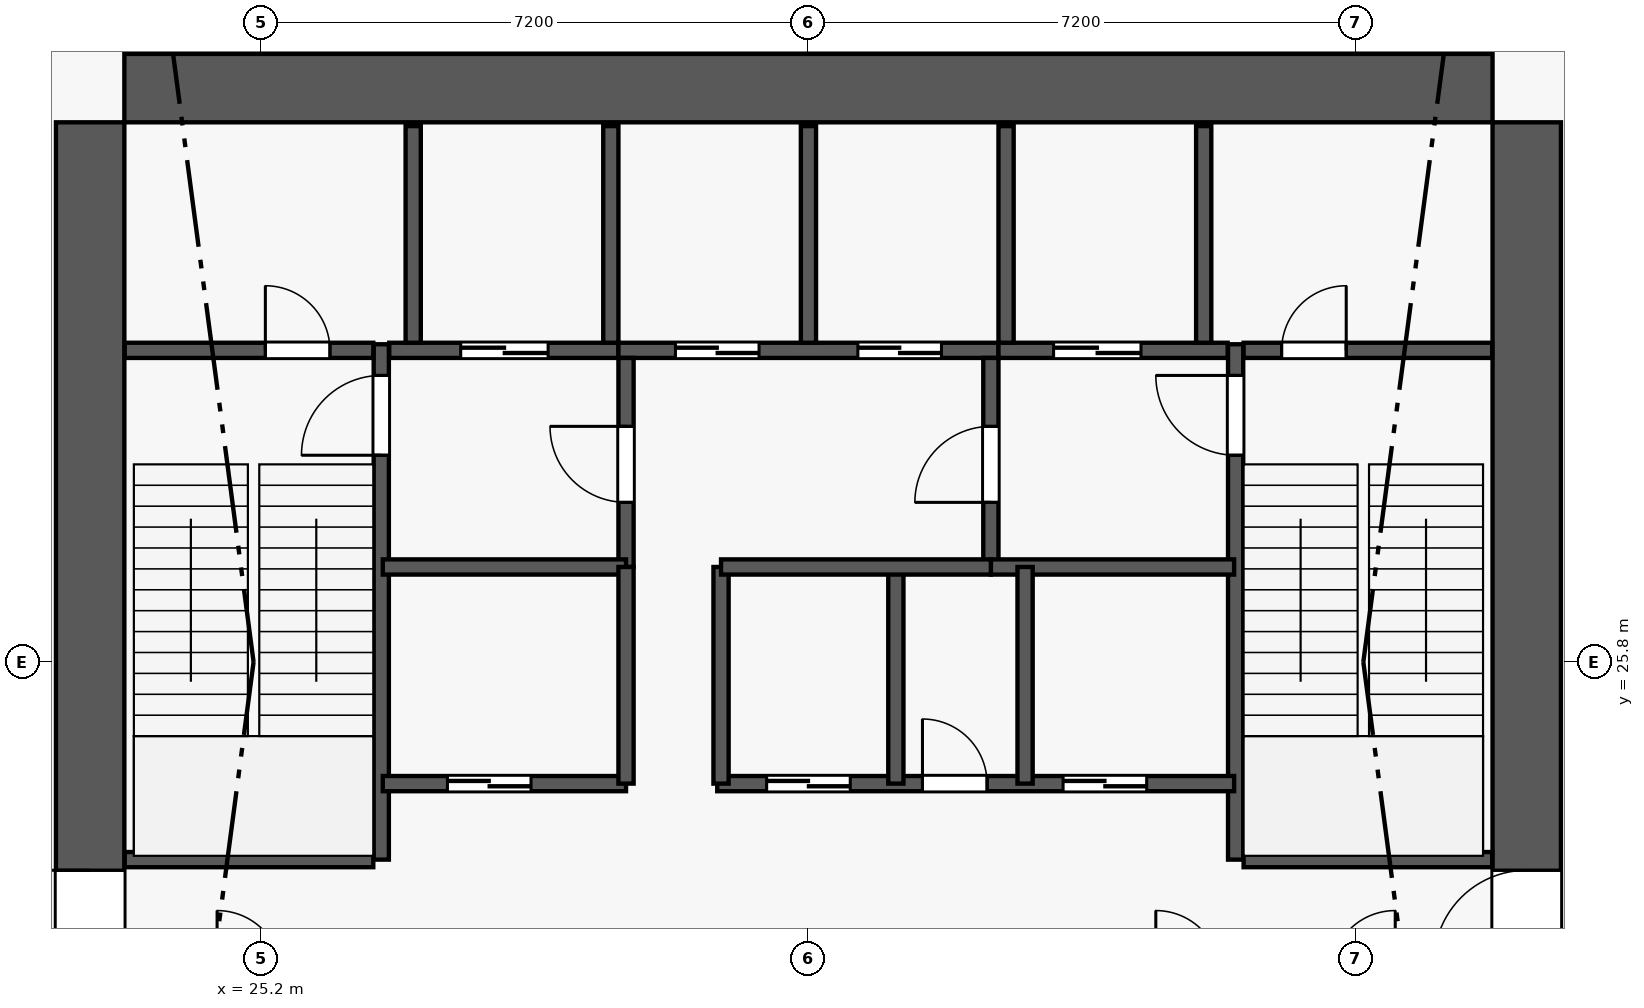
"""IFC4 building model, lengths in metres.
Left out: names, types, materials, properties, quantities, classifications, styles, units other than length and angle.
Written with IfcOpenShell. Run it as: python <this file> out.ifc"""

import sys

from ifc_helpers import new_model, si_unit, direction, frame, frame_2d, origin, origin_2d, place, context, subcontext, project, spatial, rectangle, extrude, element, fill, save


model = new_model("IFC4")
c1 = context("Model", 3, precision=1e-05, world=origin(), true_north=direction((0.0, 1.0)))
c2 = subcontext(c1, "Body", "Model", "MODEL_VIEW")
j1 = project(units=[si_unit("LENGTHUNIT", "METRE"), si_unit("PLANEANGLEUNIT", "RADIAN")], contexts=[c1])
p1 = place(None, origin())
s1 = spatial("IfcSite", under=j1, at=p1, CompositionType="ELEMENT")
p2 = place(p1, origin())
s2 = spatial("IfcBuilding", under=s1, at=p2, CompositionType="ELEMENT")
p3 = place(p2, frame((0.0, 0.0, -4.8)))
s3 = spatial("IfcBuildingStorey", under=s2, at=p3, CompositionType="ELEMENT", Elevation=-4.8)
for number, where, z_axis, x_axis in (
    (1, (41.85, 33.35, 0.0), (0.0, 0.0, 1.0), (1.0, 0.0, 0.0)),
    (2, (22.95, 33.35, 0.0), (0.0, 0.0, 1.0), (1.0, 0.0, 0.0)),
):
    element("IfcColumn", number, at=place(p3, frame(where, z_axis=z_axis, x_axis=x_axis)), inside=s3, PredefinedType="COLUMN", context=c2, shape_type="SweptSolid", body=[
        extrude(rectangle(XDim=0.9, YDim=0.9, at=origin_2d()), origin(), (0.0, 0.0, 1.0), 4.8),
    ])
p4 = place(p3, frame((23.4, 33.35, 0.0), z_axis=(0.0, 0.0, 1.0), x_axis=(1.0, 0.0, 0.0)))
e3 = element("IfcWall", 3, at=p4, inside=s3, PredefinedType="SHEAR", context=c2, shape_type="SweptSolid", body=[
    extrude(rectangle(XDim=18.0, YDim=0.9, at=frame_2d((9.0, 0.0))), origin(), (0.0, 0.0, 1.0), 4.55),
])
p5 = place(p3, frame((22.95, 18.9, 0.0), z_axis=(0.0, 0.0, 1.0), x_axis=(0.0, 1.0, 0.0)))
e4 = element("IfcWall", 4, at=p5, inside=s3, PredefinedType="SHEAR", context=c2, shape_type="SweptSolid", body=[
    extrude(rectangle(XDim=14.0, YDim=0.9, at=frame_2d((7.0, 0.0))), origin(), (0.0, 0.0, 1.0), 4.55),
])
p6 = place(p5, frame((2.94, 0.0, 0.0)))
e5 = element("IfcOpeningElement", 5, at=p6, cuts=e4, PredefinedType="OPENING", context=c2, shape_type="SweptSolid", body=[
    extrude(rectangle(XDim=1.22, YDim=2.25, at=frame_2d((0.61, 1.125))), frame((0.0, 0.46, 0.0), z_axis=(0.0, -1.0, 0.0), x_axis=(1.0, 0.0, 0.0)), (0.0, 0.0, 1.0), 0.92),
])
p7 = place(p3, frame((41.85, 18.9, 0.0), z_axis=(0.0, 0.0, 1.0), x_axis=(0.0, 1.0, 0.0)))
e6 = element("IfcWall", 6, at=p7, inside=s3, PredefinedType="SHEAR", context=c2, shape_type="SweptSolid", body=[
    extrude(rectangle(XDim=14.0, YDim=0.9, at=frame_2d((7.0, 0.0))), origin(), (0.0, 0.0, 1.0), 4.55),
])
p8 = place(p7, frame((2.94, 0.0, 0.0)))
e7 = element("IfcOpeningElement", 7, at=p8, cuts=e6, PredefinedType="OPENING", context=c2, shape_type="SweptSolid", body=[
    extrude(rectangle(XDim=1.22, YDim=2.25, at=frame_2d((0.61, 1.125))), frame((0.0, 0.46, 0.0), z_axis=(0.0, -1.0, 0.0), x_axis=(1.0, 0.0, 0.0)), (0.0, 0.0, 1.0), 0.92),
])
p9 = place(p3, frame((26.78, 23.2, 0.0), z_axis=(0.0, 0.0, 1.0), x_axis=(0.0, 1.0, 0.0)))
e8 = element("IfcWall", 8, at=p9, inside=s3, PredefinedType="SHEAR", context=c2, shape_type="SweptSolid", body=[
    extrude(rectangle(XDim=6.78, YDim=0.2, at=frame_2d((3.39, 0.0))), origin(), (0.0, 0.0, 1.0), 4.8),
])
p10 = place(p9, frame((5.32, 0.0, 0.0)))
e9 = element("IfcOpeningElement", 9, at=p10, cuts=e8, PredefinedType="OPENING", context=c2, shape_type="SweptSolid", body=[
    extrude(rectangle(XDim=1.05, YDim=2.15, at=frame_2d((0.525, 1.075))), frame((0.0, 0.11, 0.0), z_axis=(0.0, -1.0, 0.0), x_axis=(1.0, 0.0, 0.0)), (0.0, 0.0, 1.0), 0.22),
])
p11 = place(p3, frame((23.405, 23.2, 0.0), z_axis=(0.0, 0.0, 1.0), x_axis=(1.0, 0.0, 0.0)))
e10 = element("IfcWall", 10, at=p11, inside=s3, PredefinedType="PLUMBINGWALL", context=c2, shape_type="SweptSolid", body=[
    extrude(rectangle(XDim=3.27, YDim=0.2, at=frame_2d((1.635, 0.0))), origin(), (0.0, 0.0, 1.0), 4.55),
])
p12 = place(p3, frame((38.02, 23.2, 0.0), z_axis=(0.0, 0.0, 1.0), x_axis=(0.0, 1.0, 0.0)))
e11 = element("IfcWall", 11, at=p12, inside=s3, PredefinedType="SHEAR", context=c2, shape_type="SweptSolid", body=[
    extrude(rectangle(XDim=6.78, YDim=0.2, at=frame_2d((3.39, 0.0))), origin(), (0.0, 0.0, 1.0), 4.8),
])
p13 = place(p12, frame((5.32, 0.0, 0.0)))
e12 = element("IfcOpeningElement", 12, at=p13, cuts=e11, PredefinedType="OPENING", context=c2, shape_type="SweptSolid", body=[
    extrude(rectangle(XDim=1.05, YDim=2.15, at=frame_2d((0.525, 1.075))), frame((0.0, 0.11, 0.0), z_axis=(0.0, -1.0, 0.0), x_axis=(1.0, 0.0, 0.0)), (0.0, 0.0, 1.0), 0.22),
])
p14 = place(p3, frame((38.125, 23.2, 0.0), z_axis=(0.0, 0.0, 1.0), x_axis=(1.0, 0.0, 0.0)))
e13 = element("IfcWall", 13, at=p14, inside=s3, PredefinedType="PLUMBINGWALL", context=c2, shape_type="SweptSolid", body=[
    extrude(rectangle(XDim=3.27, YDim=0.2, at=frame_2d((1.635, 0.0))), origin(), (0.0, 0.0, 1.0), 4.55),
])
p15 = place(p3, frame((23.405, 29.9, 0.0), z_axis=(0.0, 0.0, 1.0), x_axis=(1.0, 0.0, 0.0)))
e14 = element("IfcWall", 14, at=p15, inside=s3, PredefinedType="PLUMBINGWALL", context=c2, shape_type="SweptSolid", body=[
    extrude(rectangle(XDim=3.27, YDim=0.2, at=frame_2d((1.635, 0.0))), origin(), (0.0, 0.0, 1.0), 4.55),
])
p16 = place(p15, frame((1.85, 0.0, 0.0)))
e15 = element("IfcOpeningElement", 15, at=p16, cuts=e14, PredefinedType="OPENING", context=c2, shape_type="SweptSolid", body=[
    extrude(rectangle(XDim=0.85, YDim=2.05, at=frame_2d((0.425, 1.025))), frame((0.0, 0.11, 0.0), z_axis=(0.0, -1.0, 0.0), x_axis=(1.0, 0.0, 0.0)), (0.0, 0.0, 1.0), 0.22),
])
p17 = place(p3, frame((26.885, 29.9, 0.0), z_axis=(0.0, 0.0, 1.0), x_axis=(1.0, 0.0, 0.0)))
e16 = element("IfcWall", 16, at=p17, inside=s3, PredefinedType="PLUMBINGWALL", context=c2, shape_type="SweptSolid", body=[
    extrude(rectangle(XDim=3.015, YDim=0.2, at=frame_2d((1.507, 0.0))), origin(), (0.0, 0.0, 1.0), 4.55),
])
p18 = place(p17, frame((0.94, 0.0, 0.0)))
e17 = element("IfcOpeningElement", 17, at=p18, cuts=e16, PredefinedType="OPENING", context=c2, shape_type="SweptSolid", body=[
    extrude(rectangle(XDim=1.15, YDim=2.2, at=frame_2d((0.575, 1.1))), frame((0.0, 0.11, 0.0), z_axis=(0.0, -1.0, 0.0), x_axis=(1.0, 0.0, 0.0)), (0.0, 0.0, 1.0), 0.22),
])
p19 = place(p3, frame((29.9, 29.9, 0.0), z_axis=(0.0, 0.0, 1.0), x_axis=(1.0, 0.0, 0.0)))
e18 = element("IfcWall", 18, at=p19, inside=s3, PredefinedType="PLUMBINGWALL", context=c2, shape_type="SweptSolid", body=[
    extrude(rectangle(XDim=5.0, YDim=0.2, at=frame_2d((2.5, 0.0))), origin(), (0.0, 0.0, 1.0), 4.55),
])
p20 = place(p19, frame((0.75, 0.0, 0.0)))
e19 = element("IfcOpeningElement", 19, at=p20, cuts=e18, PredefinedType="OPENING", context=c2, shape_type="SweptSolid", body=[
    extrude(rectangle(XDim=1.1, YDim=2.2, at=frame_2d((0.55, 1.1))), frame((0.0, 0.11, 0.0), z_axis=(0.0, -1.0, 0.0), x_axis=(1.0, 0.0, 0.0)), (0.0, 0.0, 1.0), 0.22),
])
p21 = place(p19, frame((3.15, 0.0, 0.0)))
e20 = element("IfcOpeningElement", 20, at=p21, cuts=e18, PredefinedType="OPENING", context=c2, shape_type="SweptSolid", body=[
    extrude(rectangle(XDim=1.1, YDim=2.2, at=frame_2d((0.55, 1.1))), frame((0.0, 0.11, 0.0), z_axis=(0.0, -1.0, 0.0), x_axis=(1.0, 0.0, 0.0)), (0.0, 0.0, 1.0), 0.22),
])
p22 = place(p3, frame((34.9, 29.9, 0.0), z_axis=(0.0, 0.0, 1.0), x_axis=(1.0, 0.0, 0.0)))
e21 = element("IfcWall", 21, at=p22, inside=s3, PredefinedType="PLUMBINGWALL", context=c2, shape_type="SweptSolid", body=[
    extrude(rectangle(XDim=3.015, YDim=0.2, at=frame_2d((1.508, 0.0))), origin(), (0.0, 0.0, 1.0), 4.55),
])
p23 = place(p22, frame((0.725, 0.0, 0.0)))
e22 = element("IfcOpeningElement", 22, at=p23, cuts=e21, PredefinedType="OPENING", context=c2, shape_type="SweptSolid", body=[
    extrude(rectangle(XDim=1.15, YDim=2.2, at=frame_2d((0.575, 1.1))), frame((0.0, 0.11, 0.0), z_axis=(0.0, -1.0, 0.0), x_axis=(1.0, 0.0, 0.0)), (0.0, 0.0, 1.0), 0.22),
])
p24 = place(p3, frame((38.125, 29.9, 0.0), z_axis=(0.0, 0.0, 1.0), x_axis=(1.0, 0.0, 0.0)))
e23 = element("IfcWall", 23, at=p24, inside=s3, PredefinedType="PLUMBINGWALL", context=c2, shape_type="SweptSolid", body=[
    extrude(rectangle(XDim=3.27, YDim=0.2, at=frame_2d((1.635, 0.0))), origin(), (0.0, 0.0, 1.0), 4.55),
])
p25 = place(p24, frame((0.5, 0.0, 0.0)))
e24 = element("IfcOpeningElement", 24, at=p25, cuts=e23, PredefinedType="OPENING", context=c2, shape_type="SweptSolid", body=[
    extrude(rectangle(XDim=0.85, YDim=2.05, at=frame_2d((0.425, 1.025))), frame((0.0, 0.11, 0.0), z_axis=(0.0, -1.0, 0.0), x_axis=(1.0, 0.0, 0.0)), (0.0, 0.0, 1.0), 0.22),
])
for number, where, z_axis, x_axis in (
    (25, (27.2, 30.0, 0.0), (0.0, 0.0, 1.0), (0.0, 1.0, 0.0)),
    (26, (29.8, 30.0, 0.0), (0.0, 0.0, 1.0), (0.0, 1.0, 0.0)),
    (27, (32.4, 30.0, 0.0), (0.0, 0.0, 1.0), (0.0, 1.0, 0.0)),
    (28, (35.0, 30.0, 0.0), (0.0, 0.0, 1.0), (0.0, 1.0, 0.0)),
    (29, (37.6, 30.0, 0.0), (0.0, 0.0, 1.0), (0.0, 1.0, 0.0)),
):
    element("IfcWall", number, at=place(p3, frame(where, z_axis=z_axis, x_axis=x_axis)), inside=s3, PredefinedType="PLUMBINGWALL", context=c2, shape_type="SweptSolid", body=[
        extrude(rectangle(XDim=2.85, YDim=0.2, at=frame_2d((1.425, 0.0))), origin(), (0.0, 0.0, 1.0), 4.55),
    ])
p26 = place(p3, frame((30.0, 27.05, 0.0), z_axis=(0.0, 0.0, 1.0), x_axis=(0.0, 1.0, 0.0)))
e30 = element("IfcWall", 30, at=p26, inside=s3, PredefinedType="PLUMBINGWALL", context=c2, shape_type="SweptSolid", body=[
    extrude(rectangle(XDim=2.75, YDim=0.2, at=frame_2d((1.375, 0.0))), origin(), (0.0, 0.0, 1.0), 4.55),
])
p27 = place(p26, frame((0.85, 0.0, 0.0)))
e31 = element("IfcOpeningElement", 31, at=p27, cuts=e30, PredefinedType="OPENING", context=c2, shape_type="SweptSolid", body=[
    extrude(rectangle(XDim=1.0, YDim=2.15, at=frame_2d((0.5, 1.075))), frame((0.0, 0.11, 0.0), z_axis=(0.0, -1.0, 0.0), x_axis=(1.0, 0.0, 0.0)), (0.0, 0.0, 1.0), 0.22),
])
p28 = place(p3, frame((26.8, 27.05, 0.0), z_axis=(0.0, 0.0, 1.0), x_axis=(1.0, 0.0, 0.0)))
e32 = element("IfcWall", 32, at=p28, inside=s3, PredefinedType="PLUMBINGWALL", context=c2, shape_type="SweptSolid", body=[
    extrude(rectangle(XDim=3.2, YDim=0.2, at=frame_2d((1.6, 0.0))), origin(), (0.0, 0.0, 1.0), 4.55),
])
p29 = place(p3, frame((34.8, 27.05, 0.0), z_axis=(0.0, 0.0, 1.0), x_axis=(0.0, 1.0, 0.0)))
e33 = element("IfcWall", 33, at=p29, inside=s3, PredefinedType="PLUMBINGWALL", context=c2, shape_type="SweptSolid", body=[
    extrude(rectangle(XDim=2.75, YDim=0.2, at=frame_2d((1.375, 0.0))), origin(), (0.0, 0.0, 1.0), 4.55),
])
p30 = place(p29, frame((0.85, 0.0, 0.0)))
e34 = element("IfcOpeningElement", 34, at=p30, cuts=e33, PredefinedType="OPENING", context=c2, shape_type="SweptSolid", body=[
    extrude(rectangle(XDim=1.0, YDim=2.15, at=frame_2d((0.5, 1.075))), frame((0.0, 0.11, 0.0), z_axis=(0.0, -1.0, 0.0), x_axis=(1.0, 0.0, 0.0)), (0.0, 0.0, 1.0), 0.22),
])
p31 = place(p3, frame((34.8, 27.05, 0.0), z_axis=(0.0, 0.0, 1.0), x_axis=(1.0, 0.0, 0.0)))
e35 = element("IfcWall", 35, at=p31, inside=s3, PredefinedType="PLUMBINGWALL", context=c2, shape_type="SweptSolid", body=[
    extrude(rectangle(XDim=3.2, YDim=0.2, at=frame_2d((1.6, 0.0))), origin(), (0.0, 0.0, 1.0), 4.55),
])
p32 = place(p3, frame((26.8, 24.2, 0.0), z_axis=(0.0, 0.0, 1.0), x_axis=(1.0, 0.0, 0.0)))
e36 = element("IfcWall", 36, at=p32, inside=s3, PredefinedType="PLUMBINGWALL", context=c2, shape_type="SweptSolid", body=[
    extrude(rectangle(XDim=3.2, YDim=0.2, at=frame_2d((1.6, 0.0))), origin(), (0.0, 0.0, 1.0), 4.55),
])
p33 = place(p32, frame((0.85, 0.0, 0.0)))
e37 = element("IfcOpeningElement", 37, at=p33, cuts=e36, PredefinedType="OPENING", context=c2, shape_type="SweptSolid", body=[
    extrude(rectangle(XDim=1.1, YDim=2.2, at=frame_2d((0.55, 1.1))), frame((0.0, 0.11, 0.0), z_axis=(0.0, -1.0, 0.0), x_axis=(1.0, 0.0, 0.0)), (0.0, 0.0, 1.0), 0.22),
])
p34 = place(p3, frame((30.0, 24.2, 0.0), z_axis=(0.0, 0.0, 1.0), x_axis=(0.0, 1.0, 0.0)))
e38 = element("IfcWall", 38, at=p34, inside=s3, PredefinedType="PLUMBINGWALL", context=c2, shape_type="SweptSolid", body=[
    extrude(rectangle(XDim=2.85, YDim=0.2, at=frame_2d((1.425, 0.0))), origin(), (0.0, 0.0, 1.0), 4.55),
])
p35 = place(p3, frame((31.2, 24.2, 0.0), z_axis=(0.0, 0.0, 1.0), x_axis=(1.0, 0.0, 0.0)))
e39 = element("IfcWall", 39, at=p35, inside=s3, PredefinedType="PLUMBINGWALL", context=c2, shape_type="SweptSolid", body=[
    extrude(rectangle(XDim=6.8, YDim=0.2, at=frame_2d((3.4, 0.0))), origin(), (0.0, 0.0, 1.0), 4.55),
])
p36 = place(p35, frame((0.65, 0.0, 0.0)))
e40 = element("IfcOpeningElement", 40, at=p36, cuts=e39, PredefinedType="OPENING", context=c2, shape_type="SweptSolid", body=[
    extrude(rectangle(XDim=1.1, YDim=2.2, at=frame_2d((0.55, 1.1))), frame((0.0, 0.11, 0.0), z_axis=(0.0, -1.0, 0.0), x_axis=(1.0, 0.0, 0.0)), (0.0, 0.0, 1.0), 0.22),
])
p37 = place(p35, frame((2.7, 0.0, 0.0)))
e41 = element("IfcOpeningElement", 41, at=p37, cuts=e39, PredefinedType="OPENING", context=c2, shape_type="SweptSolid", body=[
    extrude(rectangle(XDim=0.85, YDim=2.05, at=frame_2d((0.425, 1.025))), frame((0.0, 0.11, 0.0), z_axis=(0.0, -1.0, 0.0), x_axis=(1.0, 0.0, 0.0)), (0.0, 0.0, 1.0), 0.22),
])
p38 = place(p35, frame((4.55, 0.0, 0.0)))
e42 = element("IfcOpeningElement", 42, at=p38, cuts=e39, PredefinedType="OPENING", context=c2, shape_type="SweptSolid", body=[
    extrude(rectangle(XDim=1.1, YDim=2.2, at=frame_2d((0.55, 1.1))), frame((0.0, 0.11, 0.0), z_axis=(0.0, -1.0, 0.0), x_axis=(1.0, 0.0, 0.0)), (0.0, 0.0, 1.0), 0.22),
])
for number, where, z_axis, x_axis in (
    (43, (31.25, 24.2, 0.0), (0.0, 0.0, 1.0), (0.0, 1.0, 0.0)),
    (44, (33.55, 24.2, 0.0), (0.0, 0.0, 1.0), (0.0, 1.0, 0.0)),
    (45, (35.25, 24.2, 0.0), (0.0, 0.0, 1.0), (0.0, 1.0, 0.0)),
):
    element("IfcWall", number, at=place(p3, frame(where, z_axis=z_axis, x_axis=x_axis)), inside=s3, PredefinedType="PLUMBINGWALL", context=c2, shape_type="SweptSolid", body=[
        extrude(rectangle(XDim=2.85, YDim=0.2, at=frame_2d((1.425, 0.0))), origin(), (0.0, 0.0, 1.0), 4.55),
    ])
p39 = place(p3, frame((31.25, 27.05, 0.0), z_axis=(0.0, 0.0, 1.0), x_axis=(1.0, 0.0, 0.0)))
e46 = element("IfcWall", 46, at=p39, inside=s3, PredefinedType="PLUMBINGWALL", context=c2, shape_type="SweptSolid", body=[
    extrude(rectangle(XDim=3.55, YDim=0.2, at=frame_2d((1.775, 0.0))), origin(), (0.0, 0.0, 1.0), 4.55),
])
p40 = place(p6, origin())
e47 = element("IfcDoor", 47, at=p40, inside=s3, OperationType="SINGLE_SWING_RIGHT", PredefinedType="DOOR", context=c2, shape_type="SweptSolid", body=[
    extrude(rectangle(XDim=1.22, YDim=2.25, at=frame_2d((0.61, 1.125))), frame((0.0, 0.025, 0.0), z_axis=(0.0, -1.0, 0.0), x_axis=(1.0, 0.0, 0.0)), (0.0, 0.0, 1.0), 0.05),
])
fill(e5, e47)
p41 = place(p8, origin())
e48 = element("IfcDoor", 48, at=p41, inside=s3, OperationType="SINGLE_SWING_LEFT", PredefinedType="DOOR", context=c2, shape_type="SweptSolid", body=[
    extrude(rectangle(XDim=1.22, YDim=2.25, at=frame_2d((0.61, 1.125))), frame((0.0, 0.025, 0.0), z_axis=(0.0, -1.0, 0.0), x_axis=(1.0, 0.0, 0.0)), (0.0, 0.0, 1.0), 0.05),
])
fill(e7, e48)
p42 = place(p10, origin())
e49 = element("IfcDoor", 49, at=p42, inside=s3, OperationType="SINGLE_SWING_LEFT", PredefinedType="DOOR", context=c2, shape_type="SweptSolid", body=[
    extrude(rectangle(XDim=1.05, YDim=2.15, at=frame_2d((0.525, 1.075))), frame((0.0, 0.025, 0.0), z_axis=(0.0, -1.0, 0.0), x_axis=(1.0, 0.0, 0.0)), (0.0, 0.0, 1.0), 0.05),
])
fill(e9, e49)
p43 = place(p13, origin())
e50 = element("IfcDoor", 50, at=p43, inside=s3, OperationType="SINGLE_SWING_RIGHT", PredefinedType="DOOR", context=c2, shape_type="SweptSolid", body=[
    extrude(rectangle(XDim=1.05, YDim=2.15, at=frame_2d((0.525, 1.075))), frame((0.0, 0.025, 0.0), z_axis=(0.0, -1.0, 0.0), x_axis=(1.0, 0.0, 0.0)), (0.0, 0.0, 1.0), 0.05),
])
fill(e12, e50)
p44 = place(p16, origin())
e51 = element("IfcDoor", 51, at=p44, inside=s3, OperationType="SINGLE_SWING_LEFT", PredefinedType="DOOR", context=c2, shape_type="SweptSolid", body=[
    extrude(rectangle(XDim=0.85, YDim=2.05, at=frame_2d((0.425, 1.025))), frame((0.0, 0.025, 0.0), z_axis=(0.0, -1.0, 0.0), x_axis=(1.0, 0.0, 0.0)), (0.0, 0.0, 1.0), 0.05),
])
fill(e15, e51)
p45 = place(p25, origin())
e52 = element("IfcDoor", 52, at=p45, inside=s3, OperationType="SINGLE_SWING_RIGHT", PredefinedType="DOOR", context=c2, shape_type="SweptSolid", body=[
    extrude(rectangle(XDim=0.85, YDim=2.05, at=frame_2d((0.425, 1.025))), frame((0.0, 0.025, 0.0), z_axis=(0.0, -1.0, 0.0), x_axis=(1.0, 0.0, 0.0)), (0.0, 0.0, 1.0), 0.05),
])
fill(e24, e52)
p46 = place(p18, origin())
e53 = element("IfcDoor", 53, at=p46, inside=s3, OperationType="DOUBLE_DOOR_SLIDING", PredefinedType="DOOR", context=c2, shape_type="SweptSolid", body=[
    extrude(rectangle(XDim=1.15, YDim=2.2, at=frame_2d((0.575, 1.1))), frame((0.0, 0.025, 0.0), z_axis=(0.0, -1.0, 0.0), x_axis=(1.0, 0.0, 0.0)), (0.0, 0.0, 1.0), 0.05),
])
fill(e17, e53)
p47 = place(p23, origin())
e54 = element("IfcDoor", 54, at=p47, inside=s3, OperationType="DOUBLE_DOOR_SLIDING", PredefinedType="DOOR", context=c2, shape_type="SweptSolid", body=[
    extrude(rectangle(XDim=1.15, YDim=2.2, at=frame_2d((0.575, 1.1))), frame((0.0, 0.025, 0.0), z_axis=(0.0, -1.0, 0.0), x_axis=(1.0, 0.0, 0.0)), (0.0, 0.0, 1.0), 0.05),
])
fill(e22, e54)
p48 = place(p20, origin())
e55 = element("IfcDoor", 55, at=p48, inside=s3, OperationType="DOUBLE_DOOR_SLIDING", PredefinedType="DOOR", context=c2, shape_type="SweptSolid", body=[
    extrude(rectangle(XDim=1.1, YDim=2.2, at=frame_2d((0.55, 1.1))), frame((0.0, 0.025, 0.0), z_axis=(0.0, -1.0, 0.0), x_axis=(1.0, 0.0, 0.0)), (0.0, 0.0, 1.0), 0.05),
])
fill(e19, e55)
p49 = place(p21, origin())
e56 = element("IfcDoor", 56, at=p49, inside=s3, OperationType="DOUBLE_DOOR_SLIDING", PredefinedType="DOOR", context=c2, shape_type="SweptSolid", body=[
    extrude(rectangle(XDim=1.1, YDim=2.2, at=frame_2d((0.55, 1.1))), frame((0.0, 0.025, 0.0), z_axis=(0.0, -1.0, 0.0), x_axis=(1.0, 0.0, 0.0)), (0.0, 0.0, 1.0), 0.05),
])
fill(e20, e56)
p50 = place(p27, origin())
e57 = element("IfcDoor", 57, at=p50, inside=s3, OperationType="SINGLE_SWING_RIGHT", PredefinedType="DOOR", context=c2, shape_type="SweptSolid", body=[
    extrude(rectangle(XDim=1.0, YDim=2.15, at=frame_2d((0.5, 1.075))), frame((0.0, 0.025, 0.0), z_axis=(0.0, -1.0, 0.0), x_axis=(1.0, 0.0, 0.0)), (0.0, 0.0, 1.0), 0.05),
])
fill(e31, e57)
p51 = place(p30, origin())
e58 = element("IfcDoor", 58, at=p51, inside=s3, OperationType="SINGLE_SWING_LEFT", PredefinedType="DOOR", context=c2, shape_type="SweptSolid", body=[
    extrude(rectangle(XDim=1.0, YDim=2.15, at=frame_2d((0.5, 1.075))), frame((0.0, 0.025, 0.0), z_axis=(0.0, -1.0, 0.0), x_axis=(1.0, 0.0, 0.0)), (0.0, 0.0, 1.0), 0.05),
])
fill(e34, e58)
p52 = place(p33, origin())
e59 = element("IfcDoor", 59, at=p52, inside=s3, OperationType="DOUBLE_DOOR_SLIDING", PredefinedType="DOOR", context=c2, shape_type="SweptSolid", body=[
    extrude(rectangle(XDim=1.1, YDim=2.2, at=frame_2d((0.55, 1.1))), frame((0.0, 0.025, 0.0), z_axis=(0.0, -1.0, 0.0), x_axis=(1.0, 0.0, 0.0)), (0.0, 0.0, 1.0), 0.05),
])
fill(e37, e59)
p53 = place(p36, origin())
e60 = element("IfcDoor", 60, at=p53, inside=s3, OperationType="DOUBLE_DOOR_SLIDING", PredefinedType="DOOR", context=c2, shape_type="SweptSolid", body=[
    extrude(rectangle(XDim=1.1, YDim=2.2, at=frame_2d((0.55, 1.1))), frame((0.0, 0.025, 0.0), z_axis=(0.0, -1.0, 0.0), x_axis=(1.0, 0.0, 0.0)), (0.0, 0.0, 1.0), 0.05),
])
fill(e40, e60)
p54 = place(p37, origin())
e61 = element("IfcDoor", 61, at=p54, inside=s3, OperationType="SINGLE_SWING_LEFT", PredefinedType="DOOR", context=c2, shape_type="SweptSolid", body=[
    extrude(rectangle(XDim=0.85, YDim=2.05, at=frame_2d((0.425, 1.025))), frame((0.0, 0.025, 0.0), z_axis=(0.0, -1.0, 0.0), x_axis=(1.0, 0.0, 0.0)), (0.0, 0.0, 1.0), 0.05),
])
fill(e41, e61)
p55 = place(p38, origin())
e62 = element("IfcDoor", 62, at=p55, inside=s3, OperationType="DOUBLE_DOOR_SLIDING", PredefinedType="DOOR", context=c2, shape_type="SweptSolid", body=[
    extrude(rectangle(XDim=1.1, YDim=2.2, at=frame_2d((0.55, 1.1))), frame((0.0, 0.025, 0.0), z_axis=(0.0, -1.0, 0.0), x_axis=(1.0, 0.0, 0.0)), (0.0, 0.0, 1.0), 0.05),
])
fill(e42, e62)
save(model, sys.argv[1])
